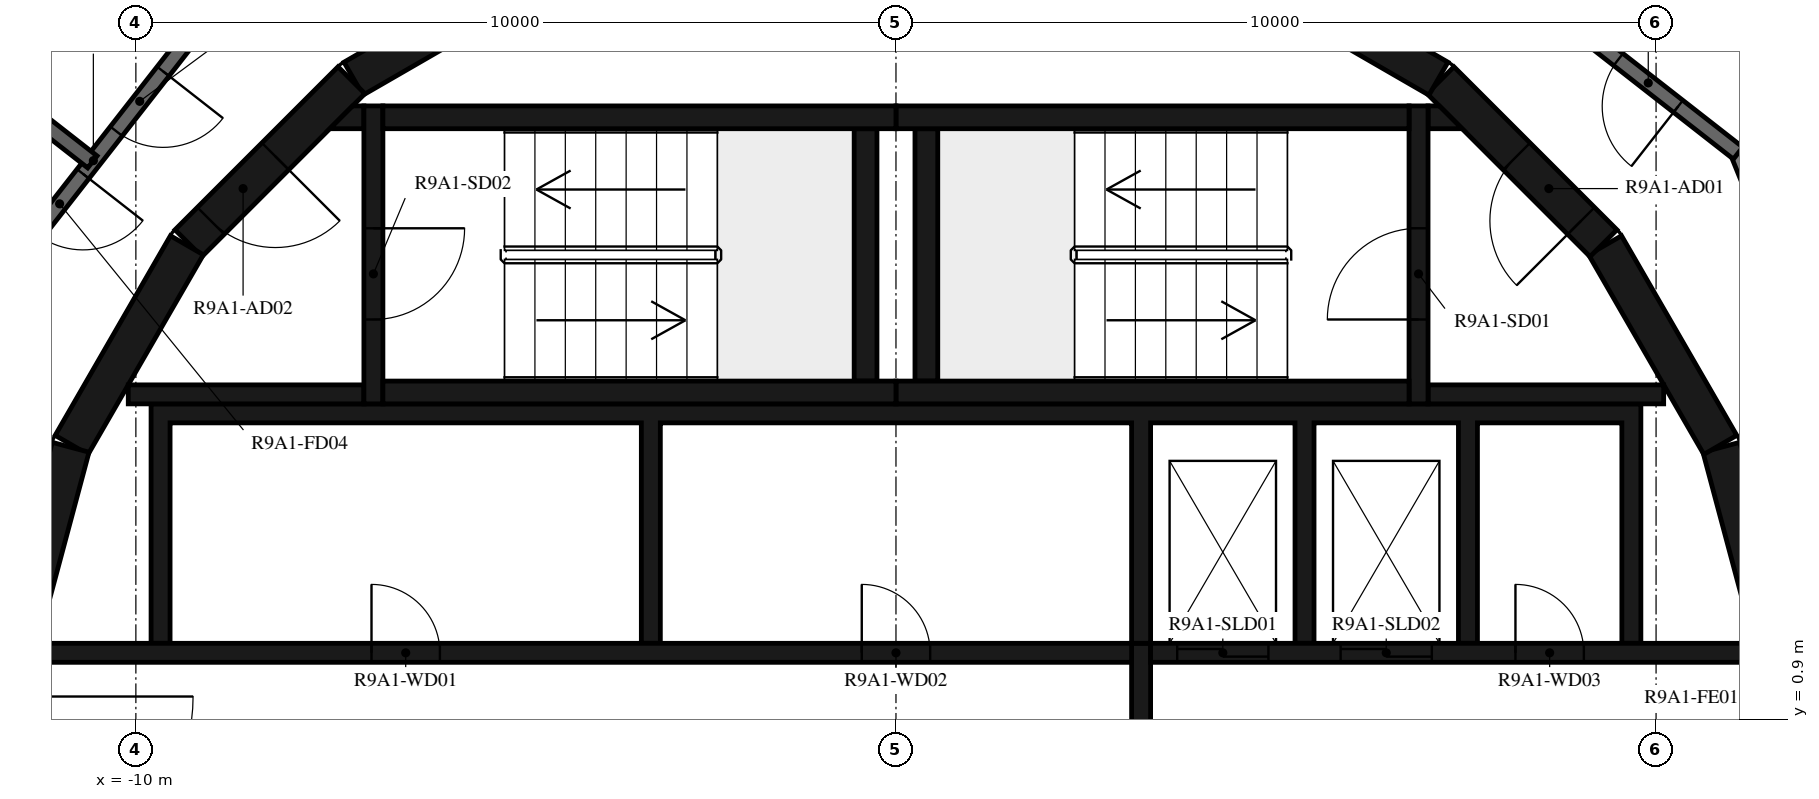
"""IFC4 building model, lengths in metres.
Left out: names, types, materials, properties, quantities, classifications, styles, units other than length and angle.
Written with IfcOpenShell. Run it as: python <this file> out.ifc"""

import sys

from ifc_helpers import new_model, si_unit, direction, frame, frame_2d, origin, place, context, subcontext, project, spatial, polyline, rectangle, outline, extrude, element, fill, save


model = new_model("IFC4")
c1 = context("Model", 3, precision=1e-05, world=origin(), true_north=direction((0.0, 1.0)))
c2 = subcontext(c1, "Body", "Model", "MODEL_VIEW")
j1 = project(units=[si_unit("LENGTHUNIT", "METRE"), si_unit("PLANEANGLEUNIT", "RADIAN")], contexts=[c1])
p1 = place(None, origin())
s1 = spatial("IfcSite", under=j1, at=p1, CompositionType="ELEMENT")
p2 = place(p1, origin())
s2 = spatial("IfcBuilding", under=s1, at=p2, CompositionType="ELEMENT")
p3 = place(p2, frame((0.0, 0.0, 336.5)))
s3 = spatial("IfcBuildingStorey", under=s2, at=p3, CompositionType="ELEMENT", Elevation=336.5)
for number, where, z_axis, x_axis in (
    (1, (11.643, 1.55, 0.0), (0.0, 0.0, 1.0), (-0.259, 0.966, 0.0)),
    (2, (10.845, 4.51, 0.0), (0.0, 0.0, 1.0), (-0.5, 0.866, 0.0)),
):
    element("IfcWall", number, at=place(p3, frame(where, z_axis=z_axis, x_axis=x_axis)), inside=s3, PredefinedType="SHEAR", context=c2, shape_type="SweptSolid", body=[
        extrude(rectangle(XDim=3.033, YDim=0.5, at=frame_2d((1.516, 0.0))), origin(), (0.0, 0.0, 1.0), 3.12),
    ])
p4 = place(p3, frame((9.308, 7.164, 0.0), z_axis=(0.0, 0.0, 1.0), x_axis=(-0.707106781187, 0.707106781187, 0.0)))
e3 = element("IfcWall", 3, at=p4, inside=s3, PredefinedType="SHEAR", context=c2, shape_type="SweptSolid", body=[
    extrude(rectangle(XDim=3.032, YDim=0.5, at=frame_2d((1.516, 0.0))), origin(), (0.0, 0.0, 1.0), 3.12),
])
p5 = place(p4, frame((0.416, 0.0, 0.0)))
e4 = element("IfcOpeningElement", 4, at=p5, cuts=e3, PredefinedType="OPENING", context=c2, shape_type="SweptSolid", body=[
    extrude(rectangle(XDim=1.2, YDim=2.1, at=frame_2d((0.6, 1.05))), frame((0.0, 0.26, 0.0), z_axis=(0.0, -1.0, 0.0), x_axis=(1.0, 0.0, 0.0)), (0.0, 0.0, 1.0), 0.52),
])
for number, where, z_axis, x_axis in (
    (5, (7.137, 9.329, 0.0), (0.0, 0.0, 1.0), (-0.866, 0.5, 0.0)),
    (6, (-4.51, 10.845, 0.0), (0.0, 0.0, 1.0), (-0.866, -0.5, 0.0)),
):
    element("IfcWall", number, at=place(p3, frame(where, z_axis=z_axis, x_axis=x_axis)), inside=s3, PredefinedType="SHEAR", context=c2, shape_type="SweptSolid", body=[
        extrude(rectangle(XDim=3.033, YDim=0.5, at=frame_2d((1.516, 0.0))), origin(), (0.0, 0.0, 1.0), 3.12),
    ])
p6 = place(p3, frame((-7.164, 9.308, 0.0), z_axis=(0.0, 0.0, 1.0), x_axis=(-0.707106781187, -0.707106781187, 0.0)))
e7 = element("IfcWall", 7, at=p6, inside=s3, PredefinedType="SHEAR", context=c2, shape_type="SweptSolid", body=[
    extrude(rectangle(XDim=3.032, YDim=0.5, at=frame_2d((1.516, 0.0))), origin(), (0.0, 0.0, 1.0), 3.12),
])
p7 = place(p6, frame((1.416, 0.0, 0.0)))
e8 = element("IfcOpeningElement", 8, at=p7, cuts=e7, PredefinedType="OPENING", context=c2, shape_type="SweptSolid", body=[
    extrude(rectangle(XDim=1.2, YDim=2.1, at=frame_2d((0.6, 1.05))), frame((0.0, 0.26, 0.0), z_axis=(0.0, -1.0, 0.0), x_axis=(1.0, 0.0, 0.0)), (0.0, 0.0, 1.0), 0.52),
])
for number, where, z_axis, x_axis in (
    (9, (-9.329, 7.137, 0.0), (0.0, 0.0, 1.0), (-0.5, -0.866, 0.0)),
    (10, (-10.858, 4.479, 0.0), (0.0, 0.0, 1.0), (-0.259, -0.966, 0.0)),
):
    element("IfcWall", number, at=place(p3, frame(where, z_axis=z_axis, x_axis=x_axis)), inside=s3, PredefinedType="SHEAR", context=c2, shape_type="SweptSolid", body=[
        extrude(rectangle(XDim=3.033, YDim=0.5, at=frame_2d((1.516, 0.0))), origin(), (0.0, 0.0, 1.0), 3.12),
    ])
for number, where, z_axis, x_axis in (
    (11, (0.0, 5.2, 0.0), (0.0, 0.0, 1.0), (1.0, 0.0, 0.0)),
    (12, (0.0, 8.82, 0.0), (0.0, 0.0, 1.0), (1.0, 0.0, 0.0)),
):
    element("IfcWall", number, at=place(p3, frame(where, z_axis=z_axis, x_axis=x_axis)), inside=s3, PredefinedType="SHEAR", context=c2, shape_type="SweptSolid", body=[
        extrude(rectangle(XDim=6.75, YDim=0.3, at=frame_2d((3.375, 0.0))), origin(), (0.0, 0.0, 1.0), 3.12),
    ])
p8 = place(p3, frame((0.4, 5.35, 0.0), z_axis=(0.0, 0.0, 1.0), x_axis=(0.0, 1.0, 0.0)))
e13 = element("IfcWall", 13, at=p8, inside=s3, PredefinedType="SHEAR", context=c2, shape_type="SweptSolid", body=[
    extrude(rectangle(XDim=3.32, YDim=0.3, at=frame_2d((1.66, 0.0))), origin(), (0.0, 0.0, 1.0), 3.12),
])
p9 = place(p3, frame((6.875, 5.05, 0.0), z_axis=(0.0, 0.0, 1.0), x_axis=(0.0, 1.0, 0.0)))
e14 = element("IfcWall", 14, at=p9, inside=s3, PredefinedType="SHEAR", context=c2, shape_type="SweptSolid", body=[
    extrude(rectangle(XDim=3.92, YDim=0.25, at=frame_2d((1.96, 0.0))), origin(), (0.0, 0.0, 1.0), 3.12),
])
p10 = place(p9, frame((1.11, 0.0, 0.0)))
e15 = element("IfcOpeningElement", 15, at=p10, cuts=e14, PredefinedType="OPENING", context=c2, shape_type="SweptSolid", body=[
    extrude(rectangle(XDim=1.2, YDim=2.1, at=frame_2d((0.6, 1.05))), frame((0.0, 0.135, 0.0), z_axis=(0.0, -1.0, 0.0), x_axis=(1.0, 0.0, 0.0)), (0.0, 0.0, 1.0), 0.27),
])
p11 = place(p3, frame((7.0, 5.175, 0.0), z_axis=(0.0, 0.0, 1.0), x_axis=(1.0, 0.0, 0.0)))
e16 = element("IfcWall", 16, at=p11, inside=s3, PredefinedType="SHEAR", context=c2, shape_type="SweptSolid", body=[
    extrude(rectangle(XDim=3.1, YDim=0.25, at=frame_2d((1.55, 0.0))), origin(), (0.0, 0.0, 1.0), 3.12),
])
p12 = place(p3, origin())
e17 = element("IfcWall", 17, at=p12, inside=s3, PredefinedType="SHEAR", context=c2, shape_type="SweptSolid", body=[
    extrude(outline(polyline([(7.448, 8.67), (7.0, 8.67), (7.0, 8.97), (7.148, 8.97), (7.448, 8.67)])), origin(), (0.0, 0.0, 1.0), 3.12),
])
for number, where, z_axis, x_axis in (
    (18, (-6.75, 5.2, 0.0), (0.0, 0.0, 1.0), (1.0, 0.0, 0.0)),
    (19, (-6.75, 8.82, 0.0), (0.0, 0.0, 1.0), (1.0, 0.0, 0.0)),
):
    element("IfcWall", number, at=place(p3, frame(where, z_axis=z_axis, x_axis=x_axis)), inside=s3, PredefinedType="SHEAR", context=c2, shape_type="SweptSolid", body=[
        extrude(rectangle(XDim=6.75, YDim=0.3, at=frame_2d((3.375, 0.0))), origin(), (0.0, 0.0, 1.0), 3.12),
    ])
p13 = place(p3, frame((-0.4, 5.35, 0.0), z_axis=(0.0, 0.0, 1.0), x_axis=(0.0, 1.0, 0.0)))
e20 = element("IfcWall", 20, at=p13, inside=s3, PredefinedType="SHEAR", context=c2, shape_type="SweptSolid", body=[
    extrude(rectangle(XDim=3.32, YDim=0.3, at=frame_2d((1.66, 0.0))), origin(), (0.0, 0.0, 1.0), 3.12),
])
p14 = place(p3, frame((-6.875, 8.97, 0.0), z_axis=(0.0, 0.0, 1.0), x_axis=(0.0, -1.0, 0.0)))
e21 = element("IfcWall", 21, at=p14, inside=s3, PredefinedType="SHEAR", context=c2, shape_type="SweptSolid", body=[
    extrude(rectangle(XDim=3.92, YDim=0.25, at=frame_2d((1.96, 0.0))), origin(), (0.0, 0.0, 1.0), 3.12),
])
p15 = place(p14, frame((1.61, 0.0, 0.0)))
e22 = element("IfcOpeningElement", 22, at=p15, cuts=e21, PredefinedType="OPENING", context=c2, shape_type="SweptSolid", body=[
    extrude(rectangle(XDim=1.2, YDim=2.1, at=frame_2d((0.6, 1.05))), frame((0.0, 0.135, 0.0), z_axis=(0.0, -1.0, 0.0), x_axis=(1.0, 0.0, 0.0)), (0.0, 0.0, 1.0), 0.27),
])
p16 = place(p3, frame((-7.0, 5.175, 0.0), z_axis=(0.0, 0.0, 1.0), x_axis=(-1.0, 0.0, 0.0)))
e23 = element("IfcWall", 23, at=p16, inside=s3, PredefinedType="SHEAR", context=c2, shape_type="SweptSolid", body=[
    extrude(rectangle(XDim=3.1, YDim=0.25, at=frame_2d((1.55, 0.0))), origin(), (0.0, 0.0, 1.0), 3.12),
])
p17 = place(p3, origin())
e24 = element("IfcWall", 24, at=p17, inside=s3, PredefinedType="SHEAR", context=c2, shape_type="SweptSolid", body=[
    extrude(outline(polyline([(-7.148, 8.97), (-7.0, 8.97), (-7.0, 8.67), (-7.448, 8.67), (-7.148, 8.97)])), origin(), (0.0, 0.0, 1.0), 3.12),
])
p18 = place(p3, origin())
e25 = element("IfcWall", 25, at=p18, inside=s3, PredefinedType="SHEAR", context=c2, shape_type="SweptSolid", body=[
    extrude(outline(polyline([(-9.8, 1.9), (-9.55, 1.9), (-9.55, 4.8), (-3.35, 4.8), (-3.35, 1.9), (-3.1, 1.9), (-3.1, 4.8), (3.1, 4.8), (3.1, 1.9), (3.35, 1.9), (3.35, 4.8), (5.25, 4.8), (5.25, 1.9), (5.5, 1.9), (5.5, 4.8), (7.4, 4.8), (7.4, 1.9), (7.65, 1.9), (7.65, 4.8), (9.55, 4.8), (9.55, 1.9), (9.8, 1.9), (9.8, 4.8), (9.8, 5.05), (-9.8, 5.05), (-9.8, 4.8), (-9.8, 1.9)])), origin(), (0.0, 0.0, 1.0), 3.12),
])
p19 = place(p3, frame((-11.28, 1.775, 0.0), z_axis=(0.0, 0.0, 1.0), x_axis=(1.0, 0.0, 0.0)))
e26 = element("IfcWall", 26, at=p19, inside=s3, PredefinedType="SHEAR", context=c2, shape_type="SweptSolid", body=[
    extrude(rectangle(XDim=14.38, YDim=0.25, at=frame_2d((7.19, 0.0))), origin(), (0.0, 0.0, 1.0), 3.12),
])
p20 = place(p19, frame((4.38, 0.0, 0.0)))
e27 = element("IfcOpeningElement", 27, at=p20, cuts=e26, PredefinedType="OPENING", context=c2, shape_type="SweptSolid", body=[
    extrude(rectangle(XDim=0.9, YDim=2.1, at=frame_2d((0.45, 1.05))), frame((0.0, 0.135, 0.0), z_axis=(0.0, -1.0, 0.0), x_axis=(1.0, 0.0, 0.0)), (0.0, 0.0, 1.0), 0.27),
])
p21 = place(p19, frame((10.83, 0.0, 0.0)))
e28 = element("IfcOpeningElement", 28, at=p21, cuts=e26, PredefinedType="OPENING", context=c2, shape_type="SweptSolid", body=[
    extrude(rectangle(XDim=0.9, YDim=2.1, at=frame_2d((0.45, 1.05))), frame((0.0, 0.135, 0.0), z_axis=(0.0, -1.0, 0.0), x_axis=(1.0, 0.0, 0.0)), (0.0, 0.0, 1.0), 0.27),
])
p22 = place(p3, frame((3.35, 1.775, 0.0), z_axis=(0.0, 0.0, 1.0), x_axis=(1.0, 0.0, 0.0)))
e29 = element("IfcWall", 29, at=p22, inside=s3, PredefinedType="SHEAR", context=c2, shape_type="SweptSolid", body=[
    extrude(rectangle(XDim=7.93, YDim=0.25, at=frame_2d((3.965, 0.0))), origin(), (0.0, 0.0, 1.0), 3.12),
])
p23 = place(p22, frame((0.35, 0.0, 0.0)))
e30 = element("IfcOpeningElement", 30, at=p23, cuts=e29, PredefinedType="OPENING", context=c2, shape_type="SweptSolid", body=[
    extrude(rectangle(XDim=1.2, YDim=2.4, at=frame_2d((0.6, 1.2))), frame((0.0, 0.135, 0.0), z_axis=(0.0, -1.0, 0.0), x_axis=(1.0, 0.0, 0.0)), (0.0, 0.0, 1.0), 0.27),
])
p24 = place(p22, frame((2.5, 0.0, 0.0)))
e31 = element("IfcOpeningElement", 31, at=p24, cuts=e29, PredefinedType="OPENING", context=c2, shape_type="SweptSolid", body=[
    extrude(rectangle(XDim=1.2, YDim=2.4, at=frame_2d((0.6, 1.2))), frame((0.0, 0.135, 0.0), z_axis=(0.0, -1.0, 0.0), x_axis=(1.0, 0.0, 0.0)), (0.0, 0.0, 1.0), 0.27),
])
p25 = place(p22, frame((4.8, 0.0, 0.0)))
e32 = element("IfcOpeningElement", 32, at=p25, cuts=e29, PredefinedType="OPENING", context=c2, shape_type="SweptSolid", body=[
    extrude(rectangle(XDim=0.9, YDim=2.1, at=frame_2d((0.45, 1.05))), frame((0.0, 0.135, 0.0), z_axis=(0.0, -1.0, 0.0), x_axis=(1.0, 0.0, 0.0)), (0.0, 0.0, 1.0), 0.27),
])
p26 = place(p3, frame((3.225, -1.9, 0.0), z_axis=(0.0, 0.0, 1.0), x_axis=(0.0, 1.0, 0.0)))
e33 = element("IfcWall", 33, at=p26, inside=s3, PredefinedType="SHEAR", context=c2, shape_type="SweptSolid", body=[
    extrude(rectangle(XDim=3.8, YDim=0.25, at=frame_2d((1.9, 0.0))), origin(), (0.0, 0.0, 1.0), 3.12),
])
p27 = place(p3, frame((13.769, 1.691, 0.0), z_axis=(0.0, 0.0, 1.0), x_axis=(-0.374618189599, 0.92717916932, 0.0)))
e34 = element("IfcWall", 34, at=p27, inside=s3, PredefinedType="STANDARD", context=c2, shape_type="SweptSolid", body=[
    extrude(rectangle(XDim=7.181, YDim=0.2, at=frame_2d((3.591, 0.0))), origin(), (0.0, 0.0, 1.0), 3.12),
])
p28 = place(p27, frame((2.371, 0.0, 0.0)))
e35 = element("IfcOpeningElement", 35, at=p28, cuts=e34, PredefinedType="OPENING", context=c2, shape_type="SweptSolid", body=[
    extrude(rectangle(XDim=1.0, YDim=2.1, at=frame_2d((0.5, 1.05))), frame((0.0, 0.11, 0.0), z_axis=(0.0, -1.0, 0.0), x_axis=(1.0, 0.0, 0.0)), (0.0, 0.0, 1.0), 0.22),
])
p29 = place(p3, frame((11.079, 8.349, 0.0), z_axis=(0.0, 0.0, 1.0), x_axis=(-0.78800478687, 0.615669112324, 0.0)))
e36 = element("IfcWall", 36, at=p29, inside=s3, PredefinedType="STANDARD", context=c2, shape_type="SweptSolid", body=[
    extrude(rectangle(XDim=7.181, YDim=0.2, at=frame_2d((3.591, 0.0))), origin(), (0.0, 0.0, 1.0), 3.12),
])
p30 = place(p29, frame((1.0, 0.0, 0.0)))
e37 = element("IfcOpeningElement", 37, at=p30, cuts=e36, PredefinedType="OPENING", context=c2, shape_type="SweptSolid", body=[
    extrude(rectangle(XDim=1.0, YDim=2.1, at=frame_2d((0.5, 1.05))), frame((0.0, 0.11, 0.0), z_axis=(0.0, -1.0, 0.0), x_axis=(1.0, 0.0, 0.0)), (0.0, 0.0, 1.0), 0.22),
])
p31 = place(p3, frame((-8.349, 11.079, 0.0), z_axis=(0.0, 0.0, 1.0), x_axis=(-0.615669112324, -0.78800478687, 0.0)))
e38 = element("IfcWall", 38, at=p31, inside=s3, PredefinedType="STANDARD", context=c2, shape_type="SweptSolid", body=[
    extrude(rectangle(XDim=7.181, YDim=0.2, at=frame_2d((3.591, 0.0))), origin(), (0.0, 0.0, 1.0), 3.12),
])
p32 = place(p31, frame((2.1, 0.0, 0.0)))
e39 = element("IfcOpeningElement", 39, at=p32, cuts=e38, PredefinedType="OPENING", context=c2, shape_type="SweptSolid", body=[
    extrude(rectangle(XDim=1.0, YDim=2.1, at=frame_2d((0.5, 1.05))), frame((0.0, 0.11, 0.0), z_axis=(0.0, -1.0, 0.0), x_axis=(1.0, 0.0, 0.0)), (0.0, 0.0, 1.0), 0.22),
])
p33 = place(p31, frame((3.811, 0.0, 0.0)))
e40 = element("IfcOpeningElement", 40, at=p33, cuts=e38, PredefinedType="OPENING", context=c2, shape_type="SweptSolid", body=[
    extrude(rectangle(XDim=1.0, YDim=2.1, at=frame_2d((0.5, 1.05))), frame((0.0, 0.11, 0.0), z_axis=(0.0, -1.0, 0.0), x_axis=(1.0, 0.0, 0.0)), (0.0, 0.0, 1.0), 0.22),
])
p34 = place(p3, frame((-12.479, 9.723, 0.0), z_axis=(0.0, 0.0, 1.0), x_axis=(0.788030490991, -0.615636211792, 0.0)))
e41 = element("IfcWall", 41, at=p34, inside=s3, PredefinedType="STANDARD", context=c2, shape_type="SweptSolid", body=[
    extrude(rectangle(XDim=2.42, YDim=0.2, at=frame_2d((1.21, 0.0))), origin(), (0.0, 0.0, 1.0), 3.12),
])
p35 = place(p3, frame((12.319, 9.283, 0.0), z_axis=(0.0, 0.0, 1.0), x_axis=(-0.788000268464, 0.61567489546, 0.0)))
e42 = element("IfcWall", 42, at=p35, inside=s3, PredefinedType="PARTITIONING", context=c2, shape_type="SweptSolid", body=[
    extrude(rectangle(XDim=7.985, YDim=0.12, at=frame_2d((3.992, 0.0))), origin(), (0.0, 0.0, 1.0), 3.12),
])
p36 = place(p35, frame((0.2, 0.0, 0.0)))
e43 = element("IfcOpeningElement", 43, at=p36, cuts=e42, PredefinedType="OPENING", context=c2, shape_type="SweptSolid", body=[
    extrude(rectangle(XDim=0.9, YDim=2.1, at=frame_2d((0.45, 1.05))), frame((0.0, 0.07, 0.0), z_axis=(0.0, -1.0, 0.0), x_axis=(1.0, 0.0, 0.0)), (0.0, 0.0, 1.0), 0.14),
])
p37 = place(p10, origin())
e44 = element("IfcDoor", 44, at=p37, inside=s3, OperationType="SINGLE_SWING_LEFT", PredefinedType="DOOR", context=c2, shape_type="SweptSolid", body=[
    extrude(rectangle(XDim=1.2, YDim=2.1, at=frame_2d((0.6, 1.05))), frame((0.0, 0.025, 0.0), z_axis=(0.0, -1.0, 0.0), x_axis=(1.0, 0.0, 0.0)), (0.0, 0.0, 1.0), 0.05),
])
fill(e15, e44)
p38 = place(p5, origin())
e45 = element("IfcDoor", 45, at=p38, inside=s3, OperationType="SINGLE_SWING_RIGHT", PredefinedType="DOOR", context=c2, shape_type="SweptSolid", body=[
    extrude(rectangle(XDim=1.2, YDim=2.1, at=frame_2d((0.6, 1.05))), frame((0.0, 0.025, 0.0), z_axis=(0.0, -1.0, 0.0), x_axis=(1.0, 0.0, 0.0)), (0.0, 0.0, 1.0), 0.05),
])
fill(e4, e45)
p39 = place(p15, origin())
e46 = element("IfcDoor", 46, at=p39, inside=s3, OperationType="SINGLE_SWING_LEFT", PredefinedType="DOOR", context=c2, shape_type="SweptSolid", body=[
    extrude(rectangle(XDim=1.2, YDim=2.1, at=frame_2d((0.6, 1.05))), frame((0.0, 0.025, 0.0), z_axis=(0.0, -1.0, 0.0), x_axis=(1.0, 0.0, 0.0)), (0.0, 0.0, 1.0), 0.05),
])
fill(e22, e46)
p40 = place(p7, origin())
e47 = element("IfcDoor", 47, at=p40, inside=s3, OperationType="SINGLE_SWING_RIGHT", PredefinedType="DOOR", context=c2, shape_type="SweptSolid", body=[
    extrude(rectangle(XDim=1.2, YDim=2.1, at=frame_2d((0.6, 1.05))), frame((0.0, 0.025, 0.0), z_axis=(0.0, -1.0, 0.0), x_axis=(1.0, 0.0, 0.0)), (0.0, 0.0, 1.0), 0.05),
])
fill(e8, e47)
p41 = place(p23, origin())
e48 = element("IfcDoor", 48, at=p41, inside=s3, OperationType="DOUBLE_DOOR_SLIDING", PredefinedType="DOOR", context=c2, shape_type="SweptSolid", body=[
    extrude(rectangle(XDim=1.2, YDim=2.4, at=frame_2d((0.6, 1.2))), frame((0.0, 0.025, 0.0), z_axis=(0.0, -1.0, 0.0), x_axis=(1.0, 0.0, 0.0)), (0.0, 0.0, 1.0), 0.05),
])
fill(e30, e48)
p42 = place(p24, origin())
e49 = element("IfcDoor", 49, at=p42, inside=s3, OperationType="DOUBLE_DOOR_SLIDING", PredefinedType="DOOR", context=c2, shape_type="SweptSolid", body=[
    extrude(rectangle(XDim=1.2, YDim=2.4, at=frame_2d((0.6, 1.2))), frame((0.0, 0.025, 0.0), z_axis=(0.0, -1.0, 0.0), x_axis=(1.0, 0.0, 0.0)), (0.0, 0.0, 1.0), 0.05),
])
fill(e31, e49)
p43 = place(p20, origin())
e50 = element("IfcDoor", 50, at=p43, inside=s3, OperationType="SINGLE_SWING_LEFT", PredefinedType="DOOR", context=c2, shape_type="SweptSolid", body=[
    extrude(rectangle(XDim=0.9, YDim=2.1, at=frame_2d((0.45, 1.05))), frame((0.0, 0.025, 0.0), z_axis=(0.0, -1.0, 0.0), x_axis=(1.0, 0.0, 0.0)), (0.0, 0.0, 1.0), 0.05),
])
fill(e27, e50)
p44 = place(p21, origin())
e51 = element("IfcDoor", 51, at=p44, inside=s3, OperationType="SINGLE_SWING_RIGHT", PredefinedType="DOOR", context=c2, shape_type="SweptSolid", body=[
    extrude(rectangle(XDim=0.9, YDim=2.1, at=frame_2d((0.45, 1.05))), frame((0.0, 0.025, 0.0), z_axis=(0.0, -1.0, 0.0), x_axis=(1.0, 0.0, 0.0)), (0.0, 0.0, 1.0), 0.05),
])
fill(e28, e51)
p45 = place(p25, origin())
e52 = element("IfcDoor", 52, at=p45, inside=s3, OperationType="SINGLE_SWING_LEFT", PredefinedType="DOOR", context=c2, shape_type="SweptSolid", body=[
    extrude(rectangle(XDim=0.9, YDim=2.1, at=frame_2d((0.45, 1.05))), frame((0.0, 0.025, 0.0), z_axis=(0.0, -1.0, 0.0), x_axis=(1.0, 0.0, 0.0)), (0.0, 0.0, 1.0), 0.05),
])
fill(e32, e52)
p46 = place(p30, origin())
e53 = element("IfcDoor", 53, at=p46, inside=s3, OperationType="SINGLE_SWING_LEFT", PredefinedType="DOOR", context=c2, shape_type="SweptSolid", body=[
    extrude(rectangle(XDim=1.0, YDim=2.1, at=frame_2d((0.5, 1.05))), frame((0.0, 0.025, 0.0), z_axis=(0.0, -1.0, 0.0), x_axis=(1.0, 0.0, 0.0)), (0.0, 0.0, 1.0), 0.05),
])
fill(e37, e53)
p47 = place(p32, origin())
e54 = element("IfcDoor", 54, at=p47, inside=s3, OperationType="SINGLE_SWING_RIGHT", PredefinedType="DOOR", context=c2, shape_type="SweptSolid", body=[
    extrude(rectangle(XDim=1.0, YDim=2.1, at=frame_2d((0.5, 1.05))), frame((0.0, 0.025, 0.0), z_axis=(0.0, -1.0, 0.0), x_axis=(1.0, 0.0, 0.0)), (0.0, 0.0, 1.0), 0.05),
])
fill(e39, e54)
p48 = place(p33, origin())
e55 = element("IfcDoor", 55, at=p48, inside=s3, OperationType="SINGLE_SWING_LEFT", PredefinedType="DOOR", context=c2, shape_type="SweptSolid", body=[
    extrude(rectangle(XDim=1.0, YDim=2.1, at=frame_2d((0.5, 1.05))), frame((0.0, 0.025, 0.0), z_axis=(0.0, -1.0, 0.0), x_axis=(1.0, 0.0, 0.0)), (0.0, 0.0, 1.0), 0.05),
])
fill(e40, e55)
save(model, sys.argv[1])
